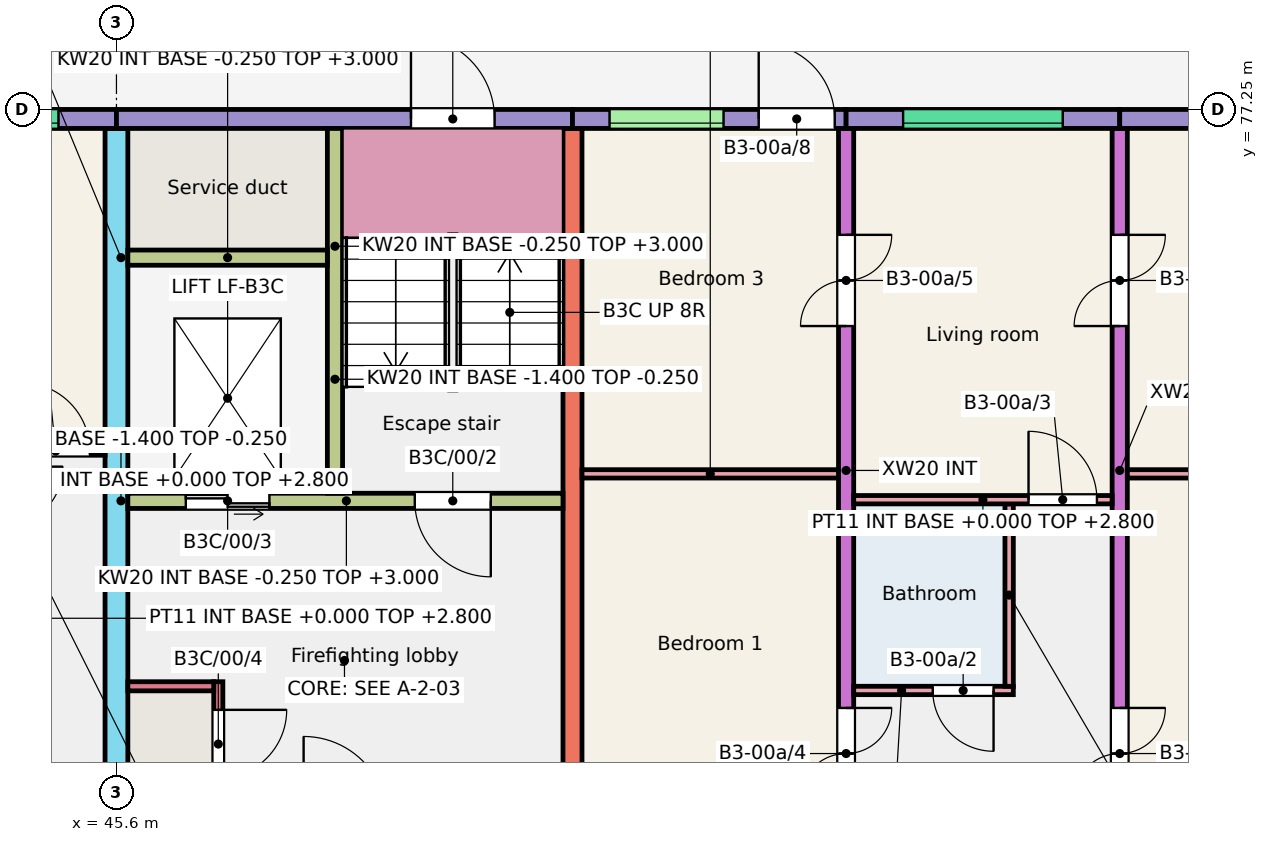
"""IFC4 building model, lengths in metres.
Left out: names, types, materials, properties, quantities, classifications, styles, units other than length and angle.
Written with IfcOpenShell. Run it as: python <this file> out.ifc"""

import sys

from ifc_helpers import new_model, si_unit, direction, frame, frame_2d, origin, place, context, subcontext, project, spatial, rectangle, extrude, element, fill, save


model = new_model("IFC4")
c1 = context("Model", 3, precision=1e-05, world=origin(), true_north=direction((0.0, 1.0)))
c2 = subcontext(c1, "Body", "Model", "MODEL_VIEW")
j1 = project(units=[si_unit("LENGTHUNIT", "METRE"), si_unit("PLANEANGLEUNIT", "RADIAN")], contexts=[c1])
p1 = place(None, origin())
s1 = spatial("IfcSite", under=j1, at=p1, CompositionType="ELEMENT")
p2 = place(p1, origin())
s2 = spatial("IfcBuilding", under=s1, at=p2, CompositionType="ELEMENT")
p3 = place(p2, origin())
s3 = spatial("IfcBuildingStorey", under=s2, at=p3, CompositionType="ELEMENT", Elevation=0.0)
p4 = place(p3, frame((45.6, 66.0, -0.25), z_axis=(0.0, 0.0, 1.0), x_axis=(0.0, 1.0, 0.0)))
e1 = element("IfcWall", 1, at=p4, inside=s3, PredefinedType="SHEAR", context=c2, shape_type="SweptSolid", body=[
    extrude(rectangle(XDim=11.0, YDim=0.3, at=frame_2d((5.5, 0.0))), origin(), (0.0, 0.0, 1.0), 3.25),
])
p5 = place(p4, frame((0.3, 0.0, 0.25)))
e2 = element("IfcOpeningElement", 2, at=p5, cuts=e1, PredefinedType="OPENING", context=c2, shape_type="SweptSolid", body=[
    extrude(rectangle(XDim=1.2, YDim=2.1, at=frame_2d((0.6, 1.05))), frame((0.0, 0.16, 0.0), z_axis=(0.0, -1.0, 0.0), x_axis=(1.0, 0.0, 0.0)), (0.0, 0.0, 1.0), 0.32),
])
p6 = place(p3, frame((51.6, 68.0, -0.25), z_axis=(0.0, 0.0, 1.0), x_axis=(0.0, 1.0, 0.0)))
e3 = element("IfcWall", 3, at=p6, inside=s3, PredefinedType="SHEAR", context=c2, shape_type="SweptSolid", body=[
    extrude(rectangle(XDim=9.0, YDim=0.25, at=frame_2d((4.5, 0.0))), origin(), (0.0, 0.0, 1.0), 3.25),
])
p7 = place(p3, frame((55.2, 68.0, -0.25), z_axis=(0.0, 0.0, 1.0), x_axis=(0.0, 1.0, 0.0)))
e4 = element("IfcWall", 4, at=p7, inside=s3, PredefinedType="SHEAR", context=c2, shape_type="SweptSolid", body=[
    extrude(rectangle(XDim=9.0, YDim=0.2, at=frame_2d((4.5, 0.0))), origin(), (0.0, 0.0, 1.0), 3.25),
])
p8 = place(p7, frame((0.175, 0.0, 0.25)))
e5 = element("IfcOpeningElement", 5, at=p8, cuts=e4, PredefinedType="OPENING", context=c2, shape_type="SweptSolid", body=[
    extrude(rectangle(XDim=1.2, YDim=2.1, at=frame_2d((0.6, 1.05))), frame((0.0, 0.11, 0.0), z_axis=(0.0, -1.0, 0.0), x_axis=(1.0, 0.0, 0.0)), (0.0, 0.0, 1.0), 0.22),
])
p9 = place(p7, frame((6.4, 0.0, 0.25)))
e6 = element("IfcOpeningElement", 6, at=p9, cuts=e4, PredefinedType="OPENING", context=c2, shape_type="SweptSolid", body=[
    extrude(rectangle(XDim=1.2, YDim=2.1, at=frame_2d((0.6, 1.05))), frame((0.0, 0.11, 0.0), z_axis=(0.0, -1.0, 0.0), x_axis=(1.0, 0.0, 0.0)), (0.0, 0.0, 1.0), 0.22),
])
p10 = place(p3, frame((58.8, 68.0, -0.25), z_axis=(0.0, 0.0, 1.0), x_axis=(0.0, 1.0, 0.0)))
e7 = element("IfcWall", 7, at=p10, inside=s3, PredefinedType="SHEAR", context=c2, shape_type="SweptSolid", body=[
    extrude(rectangle(XDim=9.0, YDim=0.2, at=frame_2d((4.5, 0.0))), origin(), (0.0, 0.0, 1.0), 3.25),
])
p11 = place(p10, frame((0.175, 0.0, 0.25)))
e8 = element("IfcOpeningElement", 8, at=p11, cuts=e7, PredefinedType="OPENING", context=c2, shape_type="SweptSolid", body=[
    extrude(rectangle(XDim=1.2, YDim=2.1, at=frame_2d((0.6, 1.05))), frame((0.0, 0.11, 0.0), z_axis=(0.0, -1.0, 0.0), x_axis=(1.0, 0.0, 0.0)), (0.0, 0.0, 1.0), 0.22),
])
p12 = place(p10, frame((6.4, 0.0, 0.25)))
e9 = element("IfcOpeningElement", 9, at=p12, cuts=e7, PredefinedType="OPENING", context=c2, shape_type="SweptSolid", body=[
    extrude(rectangle(XDim=1.2, YDim=2.1, at=frame_2d((0.6, 1.05))), frame((0.0, 0.11, 0.0), z_axis=(0.0, -1.0, 0.0), x_axis=(1.0, 0.0, 0.0)), (0.0, 0.0, 1.0), 0.22),
])
p13 = place(p3, frame((42.0, 77.125, -0.25), z_axis=(0.0, 0.0, 1.0), x_axis=(1.0, 0.0, 0.0)))
e10 = element("IfcWall", 10, at=p13, inside=s3, PredefinedType="SOLIDWALL", context=c2, shape_type="SweptSolid", body=[
    extrude(rectangle(XDim=3.6, YDim=0.25, at=frame_2d((1.8, 0.0))), origin(), (0.0, 0.0, 1.0), 3.25),
])
p14 = place(p13, frame((0.738, 0.0, 1.45)))
e11 = element("IfcOpeningElement", 11, at=p14, cuts=e10, PredefinedType="OPENING", context=c2, shape_type="SweptSolid", body=[
    extrude(rectangle(XDim=2.1, YDim=1.2, at=frame_2d((1.05, 0.6))), frame((0.0, 0.135, 0.0), z_axis=(0.0, -1.0, 0.0), x_axis=(1.0, 0.0, 0.0)), (0.0, 0.0, 1.0), 0.27),
])
p15 = place(p3, frame((45.6, 77.125, -0.25), z_axis=(0.0, 0.0, 1.0), x_axis=(1.0, 0.0, 0.0)))
e12 = element("IfcWall", 12, at=p15, inside=s3, PredefinedType="SOLIDWALL", context=c2, shape_type="SweptSolid", body=[
    extrude(rectangle(XDim=6.0, YDim=0.25, at=frame_2d((3.0, 0.0))), origin(), (0.0, 0.0, 1.0), 3.25),
])
p16 = place(p15, frame((3.875, 0.0, 0.25)))
e13 = element("IfcOpeningElement", 13, at=p16, cuts=e12, PredefinedType="OPENING", context=c2, shape_type="SweptSolid", body=[
    extrude(rectangle(XDim=1.1, YDim=2.1, at=frame_2d((0.55, 1.05))), frame((0.0, 0.135, 0.0), z_axis=(0.0, -1.0, 0.0), x_axis=(1.0, 0.0, 0.0)), (0.0, 0.0, 1.0), 0.27),
])
p17 = place(p3, frame((45.75, 72.1, -0.25), z_axis=(0.0, 0.0, 1.0), x_axis=(1.0, 0.0, 0.0)))
e14 = element("IfcWall", 14, at=p17, inside=s3, PredefinedType="SHEAR", context=c2, shape_type="SweptSolid", body=[
    extrude(rectangle(XDim=5.725, YDim=0.2, at=frame_2d((2.863, 0.0))), origin(), (0.0, 0.0, 1.0), 3.25),
])
p18 = place(p17, frame((3.775, 0.0, 0.25)))
e15 = element("IfcOpeningElement", 15, at=p18, cuts=e14, PredefinedType="OPENING", context=c2, shape_type="SweptSolid", body=[
    extrude(rectangle(XDim=1.0, YDim=2.1, at=frame_2d((0.5, 1.05))), frame((0.0, 0.11, 0.0), z_axis=(0.0, -1.0, 0.0), x_axis=(1.0, 0.0, 0.0)), (0.0, 0.0, 1.0), 0.22),
])
p19 = place(p17, frame((0.762, 0.0, 0.25)))
e16 = element("IfcOpeningElement", 16, at=p19, cuts=e14, PredefinedType="OPENING", context=c2, shape_type="SweptSolid", body=[
    extrude(rectangle(XDim=1.1, YDim=2.1, at=frame_2d((0.55, 1.05))), frame((0.0, 0.11, 0.0), z_axis=(0.0, -1.0, 0.0), x_axis=(1.0, 0.0, 0.0)), (0.0, 0.0, 1.0), 0.22),
])
p20 = place(p3, frame((48.475, 72.2, -0.25), z_axis=(0.0, 0.0, 1.0), x_axis=(0.0, 1.0, 0.0)))
e17 = element("IfcWall", 17, at=p20, inside=s3, PredefinedType="SHEAR", context=c2, shape_type="SweptSolid", body=[
    extrude(rectangle(XDim=4.8, YDim=0.2, at=frame_2d((2.4, 0.0))), origin(), (0.0, 0.0, 1.0), 3.25),
])
p21 = place(p3, frame((45.75, 75.3, -0.25), z_axis=(0.0, 0.0, 1.0), x_axis=(1.0, 0.0, 0.0)))
e18 = element("IfcWall", 18, at=p21, inside=s3, PredefinedType="SHEAR", context=c2, shape_type="SweptSolid", body=[
    extrude(rectangle(XDim=2.625, YDim=0.2, at=frame_2d((1.312, 0.0))), origin(), (0.0, 0.0, 1.0), 3.25),
])
p22 = place(p3, frame((46.94, 68.0, -0.25), z_axis=(0.0, 0.0, 1.0), x_axis=(0.0, 1.0, 0.0)))
e19 = element("IfcWall", 19, at=p22, inside=s3, PredefinedType="SHEAR", context=c2, shape_type="SweptSolid", body=[
    extrude(rectangle(XDim=1.72, YDim=0.12, at=frame_2d((0.86, 0.0))), origin(), (0.0, 0.0, 1.0), 3.25),
])
p23 = place(p22, frame((0.45, 0.0, 0.25)))
e20 = element("IfcOpeningElement", 20, at=p23, cuts=e19, PredefinedType="OPENING", context=c2, shape_type="SweptSolid", body=[
    extrude(rectangle(XDim=0.9, YDim=2.1, at=frame_2d((0.45, 1.05))), frame((0.0, 0.07, 0.0), z_axis=(0.0, -1.0, 0.0), x_axis=(1.0, 0.0, 0.0)), (0.0, 0.0, 1.0), 0.14),
])
p24 = place(p3, frame((45.75, 69.66, -0.25), z_axis=(0.0, 0.0, 1.0), x_axis=(1.0, 0.0, 0.0)))
e21 = element("IfcWall", 21, at=p24, inside=s3, PredefinedType="SHEAR", context=c2, shape_type="SweptSolid", body=[
    extrude(rectangle(XDim=1.13, YDim=0.12, at=frame_2d((0.565, 0.0))), origin(), (0.0, 0.0, 1.0), 3.25),
])
p25 = place(p3, frame((51.6, 77.125, -0.25), z_axis=(0.0, 0.0, 1.0), x_axis=(1.0, 0.0, 0.0)))
e22 = element("IfcWall", 22, at=p25, inside=s3, PredefinedType="SOLIDWALL", context=c2, shape_type="SweptSolid", body=[
    extrude(rectangle(XDim=3.6, YDim=0.25, at=frame_2d((1.8, 0.0))), origin(), (0.0, 0.0, 1.0), 3.25),
])
p26 = place(p25, frame((0.488, 0.0, 1.45)))
e23 = element("IfcOpeningElement", 23, at=p26, cuts=e22, PredefinedType="OPENING", context=c2, shape_type="SweptSolid", body=[
    extrude(rectangle(XDim=1.5, YDim=1.2, at=frame_2d((0.75, 0.6))), frame((0.0, 0.135, 0.0), z_axis=(0.0, -1.0, 0.0), x_axis=(1.0, 0.0, 0.0)), (0.0, 0.0, 1.0), 0.27),
])
p27 = place(p25, frame((2.45, 0.0, 0.25)))
e24 = element("IfcOpeningElement", 24, at=p27, cuts=e22, PredefinedType="OPENING", context=c2, shape_type="SweptSolid", body=[
    extrude(rectangle(XDim=1.0, YDim=2.1, at=frame_2d((0.5, 1.05))), frame((0.0, 0.135, 0.0), z_axis=(0.0, -1.0, 0.0), x_axis=(1.0, 0.0, 0.0)), (0.0, 0.0, 1.0), 0.27),
])
p28 = place(p3, frame((55.2, 77.125, -0.25), z_axis=(0.0, 0.0, 1.0), x_axis=(1.0, 0.0, 0.0)))
e25 = element("IfcWall", 25, at=p28, inside=s3, PredefinedType="SOLIDWALL", context=c2, shape_type="SweptSolid", body=[
    extrude(rectangle(XDim=3.6, YDim=0.25, at=frame_2d((1.8, 0.0))), origin(), (0.0, 0.0, 1.0), 3.25),
])
p29 = place(p28, frame((0.75, 0.0, 1.45)))
e26 = element("IfcOpeningElement", 26, at=p29, cuts=e25, PredefinedType="OPENING", context=c2, shape_type="SweptSolid", body=[
    extrude(rectangle(XDim=2.1, YDim=1.2, at=frame_2d((1.05, 0.6))), frame((0.0, 0.135, 0.0), z_axis=(0.0, -1.0, 0.0), x_axis=(1.0, 0.0, 0.0)), (0.0, 0.0, 1.0), 0.27),
])
p30 = place(p3, frame((58.8, 77.125, -0.25), z_axis=(0.0, 0.0, 1.0), x_axis=(1.0, 0.0, 0.0)))
e27 = element("IfcWall", 27, at=p30, inside=s3, PredefinedType="SOLIDWALL", context=c2, shape_type="SweptSolid", body=[
    extrude(rectangle(XDim=3.6, YDim=0.25, at=frame_2d((1.8, 0.0))), origin(), (0.0, 0.0, 1.0), 3.25),
])
p31 = place(p30, frame((1.175, 0.0, 1.35)))
e28 = element("IfcOpeningElement", 28, at=p31, cuts=e27, PredefinedType="OPENING", context=c2, shape_type="SweptSolid", body=[
    extrude(rectangle(XDim=1.2, YDim=1.3, at=frame_2d((0.6, 0.65))), frame((0.0, 0.135, 0.0), z_axis=(0.0, -1.0, 0.0), x_axis=(1.0, 0.0, 0.0)), (0.0, 0.0, 1.0), 0.27),
])
for number, where, z_axis, x_axis in (
    (29, (45.6, 72.1, -1.4), (0.0, 0.0, 1.0), (1.0, 0.0, 0.0)),
    (30, (45.6, 75.3, -1.4), (0.0, 0.0, 1.0), (1.0, 0.0, 0.0)),
):
    element("IfcWall", number, at=place(p3, frame(where, z_axis=z_axis, x_axis=x_axis)), inside=s3, PredefinedType="SHEAR", context=c2, shape_type="SweptSolid", body=[
        extrude(rectangle(XDim=2.975, YDim=0.2, at=frame_2d((1.487, 0.0))), origin(), (0.0, 0.0, 1.0), 1.15),
    ])
p32 = place(p3, frame((48.475, 72.2, -1.4), z_axis=(0.0, 0.0, 1.0), x_axis=(0.0, 1.0, 0.0)))
e31 = element("IfcWall", 31, at=p32, inside=s3, PredefinedType="SHEAR", context=c2, shape_type="SweptSolid", body=[
    extrude(rectangle(XDim=3.0, YDim=0.2, at=frame_2d((1.5, 0.0))), origin(), (0.0, 0.0, 1.0), 1.15),
])
p33 = place(p3, frame((45.675, 72.2, -1.4), z_axis=(0.0, 0.0, 1.0), x_axis=(0.0, 1.0, 0.0)))
e32 = element("IfcWall", 32, at=p33, inside=s3, PredefinedType="SHEAR", context=c2, shape_type="SweptSolid", body=[
    extrude(rectangle(XDim=3.0, YDim=0.15, at=frame_2d((1.5, 0.0))), origin(), (0.0, 0.0, 1.0), 1.15),
])
p34 = place(p3, frame((42.125, 72.755, 0.0), z_axis=(0.0, 0.0, 1.0), x_axis=(1.0, 0.0, 0.0)))
e33 = element("IfcWall", 33, at=p34, inside=s3, PredefinedType="PARTITIONING", context=c2, shape_type="SweptSolid", body=[
    extrude(rectangle(XDim=3.325, YDim=0.11, at=frame_2d((1.663, 0.0))), origin(), (0.0, 0.0, 1.0), 2.8),
])
p35 = place(p34, frame((2.225, 0.0, 0.0)))
e34 = element("IfcOpeningElement", 34, at=p35, cuts=e33, PredefinedType="OPENING", context=c2, shape_type="SweptSolid", body=[
    extrude(rectangle(XDim=0.9, YDim=2.1, at=frame_2d((0.45, 1.05))), frame((0.0, 0.065, 0.0), z_axis=(0.0, -1.0, 0.0), x_axis=(1.0, 0.0, 0.0)), (0.0, 0.0, 1.0), 0.13),
])
p36 = place(p3, frame((55.3, 69.605, 0.0), z_axis=(0.0, 0.0, 1.0), x_axis=(1.0, 0.0, 0.0)))
e35 = element("IfcWall", 35, at=p36, inside=s3, PredefinedType="PARTITIONING", context=c2, shape_type="SweptSolid", body=[
    extrude(rectangle(XDim=2.1, YDim=0.11, at=frame_2d((1.05, 0.0))), origin(), (0.0, 0.0, 1.0), 2.8),
])
p37 = place(p36, frame((1.04, 0.0, 0.0)))
e36 = element("IfcOpeningElement", 36, at=p37, cuts=e35, PredefinedType="OPENING", context=c2, shape_type="SweptSolid", body=[
    extrude(rectangle(XDim=0.8, YDim=2.1, at=frame_2d((0.4, 1.05))), frame((0.0, 0.065, 0.0), z_axis=(0.0, -1.0, 0.0), x_axis=(1.0, 0.0, 0.0)), (0.0, 0.0, 1.0), 0.13),
])
p38 = place(p3, frame((57.345, 69.66, 0.0), z_axis=(0.0, 0.0, 1.0), x_axis=(0.0, 1.0, 0.0)))
e37 = element("IfcWall", 37, at=p38, inside=s3, PredefinedType="PARTITIONING", context=c2, shape_type="SweptSolid", body=[
    extrude(rectangle(XDim=2.4, YDim=0.11, at=frame_2d((1.2, 0.0))), origin(), (0.0, 0.0, 1.0), 2.8),
])
p39 = place(p3, frame((55.3, 72.115, 0.0), z_axis=(0.0, 0.0, 1.0), x_axis=(1.0, 0.0, 0.0)))
e38 = element("IfcWall", 38, at=p39, inside=s3, PredefinedType="PARTITIONING", context=c2, shape_type="SweptSolid", body=[
    extrude(rectangle(XDim=3.4, YDim=0.11, at=frame_2d((1.7, 0.0))), origin(), (0.0, 0.0, 1.0), 2.8),
])
p40 = place(p39, frame((2.3, 0.0, 0.0)))
e39 = element("IfcOpeningElement", 39, at=p40, cuts=e38, PredefinedType="OPENING", context=c2, shape_type="SweptSolid", body=[
    extrude(rectangle(XDim=0.9, YDim=2.1, at=frame_2d((0.45, 1.05))), frame((0.0, 0.065, 0.0), z_axis=(0.0, -1.0, 0.0), x_axis=(1.0, 0.0, 0.0)), (0.0, 0.0, 1.0), 0.13),
])
p41 = place(p3, frame((51.725, 72.455, 0.0), z_axis=(0.0, 0.0, 1.0), x_axis=(1.0, 0.0, 0.0)))
e40 = element("IfcWall", 40, at=p41, inside=s3, PredefinedType="PARTITIONING", context=c2, shape_type="SweptSolid", body=[
    extrude(rectangle(XDim=3.375, YDim=0.11, at=frame_2d((1.688, 0.0))), origin(), (0.0, 0.0, 1.0), 2.8),
])
p42 = place(p3, frame((58.9, 72.455, 0.0), z_axis=(0.0, 0.0, 1.0), x_axis=(1.0, 0.0, 0.0)))
e41 = element("IfcWall", 41, at=p42, inside=s3, PredefinedType="PARTITIONING", context=c2, shape_type="SweptSolid", body=[
    extrude(rectangle(XDim=3.35, YDim=0.11, at=frame_2d((1.675, 0.0))), origin(), (0.0, 0.0, 1.0), 2.8),
])
p43 = place(p14, origin())
e42 = element("IfcWindow", 42, at=p43, inside=s3, PartitioningType="SINGLE_PANEL", PredefinedType="WINDOW", context=c2, shape_type="SweptSolid", body=[
    extrude(rectangle(XDim=2.1, YDim=1.2, at=frame_2d((1.05, 0.6))), frame((0.0, -0.025, 0.0), z_axis=(0.0, -1.0, 0.0), x_axis=(1.0, 0.0, 0.0)), (0.0, 0.0, 1.0), 0.06),
])
fill(e11, e42)
p44 = place(p26, origin())
e43 = element("IfcWindow", 43, at=p44, inside=s3, PartitioningType="SINGLE_PANEL", PredefinedType="WINDOW", context=c2, shape_type="SweptSolid", body=[
    extrude(rectangle(XDim=1.5, YDim=1.2, at=frame_2d((0.75, 0.6))), frame((0.0, -0.025, 0.0), z_axis=(0.0, -1.0, 0.0), x_axis=(1.0, 0.0, 0.0)), (0.0, 0.0, 1.0), 0.06),
])
fill(e23, e43)
p45 = place(p29, origin())
e44 = element("IfcWindow", 44, at=p45, inside=s3, PartitioningType="SINGLE_PANEL", PredefinedType="WINDOW", context=c2, shape_type="SweptSolid", body=[
    extrude(rectangle(XDim=2.1, YDim=1.2, at=frame_2d((1.05, 0.6))), frame((0.0, -0.025, 0.0), z_axis=(0.0, -1.0, 0.0), x_axis=(1.0, 0.0, 0.0)), (0.0, 0.0, 1.0), 0.06),
])
fill(e26, e44)
p46 = place(p35, origin())
e45 = element("IfcDoor", 45, at=p46, inside=s3, OperationType="SINGLE_SWING_LEFT", PredefinedType="DOOR", context=c2, shape_type="SweptSolid", body=[
    extrude(rectangle(XDim=0.9, YDim=2.1, at=frame_2d((0.45, 1.05))), frame((0.0, 0.025, 0.0), z_axis=(0.0, -1.0, 0.0), x_axis=(1.0, 0.0, 0.0)), (0.0, 0.0, 1.0), 0.05),
])
fill(e34, e45)
p47 = place(p37, origin())
e46 = element("IfcDoor", 46, at=p47, inside=s3, OperationType="SINGLE_SWING_RIGHT", PredefinedType="DOOR", context=c2, shape_type="SweptSolid", body=[
    extrude(rectangle(XDim=0.8, YDim=2.1, at=frame_2d((0.4, 1.05))), frame((0.0, 0.025, 0.0), z_axis=(0.0, -1.0, 0.0), x_axis=(1.0, 0.0, 0.0)), (0.0, 0.0, 1.0), 0.05),
])
fill(e36, e46)
p48 = place(p40, origin())
e47 = element("IfcDoor", 47, at=p48, inside=s3, OperationType="SINGLE_SWING_LEFT", PredefinedType="DOOR", context=c2, shape_type="SweptSolid", body=[
    extrude(rectangle(XDim=0.9, YDim=2.1, at=frame_2d((0.45, 1.05))), frame((0.0, 0.025, 0.0), z_axis=(0.0, -1.0, 0.0), x_axis=(1.0, 0.0, 0.0)), (0.0, 0.0, 1.0), 0.05),
])
fill(e39, e47)
p49 = place(p8, origin())
e48 = element("IfcDoor", 48, at=p49, inside=s3, OperationType="DOUBLE_DOOR_SINGLE_SWING", PredefinedType="DOOR", context=c2, shape_type="SweptSolid", body=[
    extrude(rectangle(XDim=1.2, YDim=2.1, at=frame_2d((0.6, 1.05))), frame((0.0, 0.025, 0.0), z_axis=(0.0, -1.0, 0.0), x_axis=(1.0, 0.0, 0.0)), (0.0, 0.0, 1.0), 0.05),
])
fill(e5, e48)
p50 = place(p9, origin())
e49 = element("IfcDoor", 49, at=p50, inside=s3, OperationType="DOUBLE_DOOR_SINGLE_SWING", PredefinedType="DOOR", context=c2, shape_type="SweptSolid", body=[
    extrude(rectangle(XDim=1.2, YDim=2.1, at=frame_2d((0.6, 1.05))), frame((0.0, 0.025, 0.0), z_axis=(0.0, -1.0, 0.0), x_axis=(1.0, 0.0, 0.0)), (0.0, 0.0, 1.0), 0.05),
])
fill(e6, e49)
p51 = place(p11, origin())
e50 = element("IfcDoor", 50, at=p51, inside=s3, OperationType="DOUBLE_DOOR_SINGLE_SWING", PredefinedType="DOOR", context=c2, shape_type="SweptSolid", body=[
    extrude(rectangle(XDim=1.2, YDim=2.1, at=frame_2d((0.6, 1.05))), frame((0.0, 0.025, 0.0), z_axis=(0.0, -1.0, 0.0), x_axis=(1.0, 0.0, 0.0)), (0.0, 0.0, 1.0), 0.05),
])
fill(e8, e50)
p52 = place(p12, origin())
e51 = element("IfcDoor", 51, at=p52, inside=s3, OperationType="DOUBLE_DOOR_SINGLE_SWING", PredefinedType="DOOR", context=c2, shape_type="SweptSolid", body=[
    extrude(rectangle(XDim=1.2, YDim=2.1, at=frame_2d((0.6, 1.05))), frame((0.0, 0.025, 0.0), z_axis=(0.0, -1.0, 0.0), x_axis=(1.0, 0.0, 0.0)), (0.0, 0.0, 1.0), 0.05),
])
fill(e9, e51)
p53 = place(p27, origin())
e52 = element("IfcDoor", 52, at=p53, inside=s3, OperationType="SINGLE_SWING_LEFT", PredefinedType="DOOR", context=c2, shape_type="SweptSolid", body=[
    extrude(rectangle(XDim=1.0, YDim=2.1, at=frame_2d((0.5, 1.05))), frame((0.0, 0.025, 0.0), z_axis=(0.0, -1.0, 0.0), x_axis=(1.0, 0.0, 0.0)), (0.0, 0.0, 1.0), 0.05),
])
fill(e24, e52)
p54 = place(p18, origin())
e53 = element("IfcDoor", 53, at=p54, inside=s3, OperationType="SINGLE_SWING_RIGHT", PredefinedType="DOOR", context=c2, shape_type="SweptSolid", body=[
    extrude(rectangle(XDim=1.0, YDim=2.1, at=frame_2d((0.5, 1.05))), frame((0.0, 0.025, 0.0), z_axis=(0.0, -1.0, 0.0), x_axis=(1.0, 0.0, 0.0)), (0.0, 0.0, 1.0), 0.05),
])
fill(e15, e53)
p55 = place(p19, origin())
e54 = element("IfcDoor", 54, at=p55, inside=s3, OperationType="DOUBLE_DOOR_SLIDING", PredefinedType="DOOR", context=c2, shape_type="SweptSolid", body=[
    extrude(rectangle(XDim=1.1, YDim=2.1, at=frame_2d((0.55, 1.05))), frame((0.0, 0.025, 0.0), z_axis=(0.0, -1.0, 0.0), x_axis=(1.0, 0.0, 0.0)), (0.0, 0.0, 1.0), 0.05),
])
fill(e16, e54)
p56 = place(p23, origin())
e55 = element("IfcDoor", 55, at=p56, inside=s3, OperationType="SINGLE_SWING_RIGHT", PredefinedType="DOOR", context=c2, shape_type="SweptSolid", body=[
    extrude(rectangle(XDim=0.9, YDim=2.1, at=frame_2d((0.45, 1.05))), frame((0.0, 0.025, 0.0), z_axis=(0.0, -1.0, 0.0), x_axis=(1.0, 0.0, 0.0)), (0.0, 0.0, 1.0), 0.05),
])
fill(e20, e55)
p57 = place(p16, origin())
e56 = element("IfcDoor", 56, at=p57, inside=s3, OperationType="SINGLE_SWING_LEFT", PredefinedType="DOOR", context=c2, shape_type="SweptSolid", body=[
    extrude(rectangle(XDim=1.1, YDim=2.1, at=frame_2d((0.55, 1.05))), frame((0.0, 0.025, 0.0), z_axis=(0.0, -1.0, 0.0), x_axis=(1.0, 0.0, 0.0)), (0.0, 0.0, 1.0), 0.05),
])
fill(e13, e56)
save(model, sys.argv[1])
